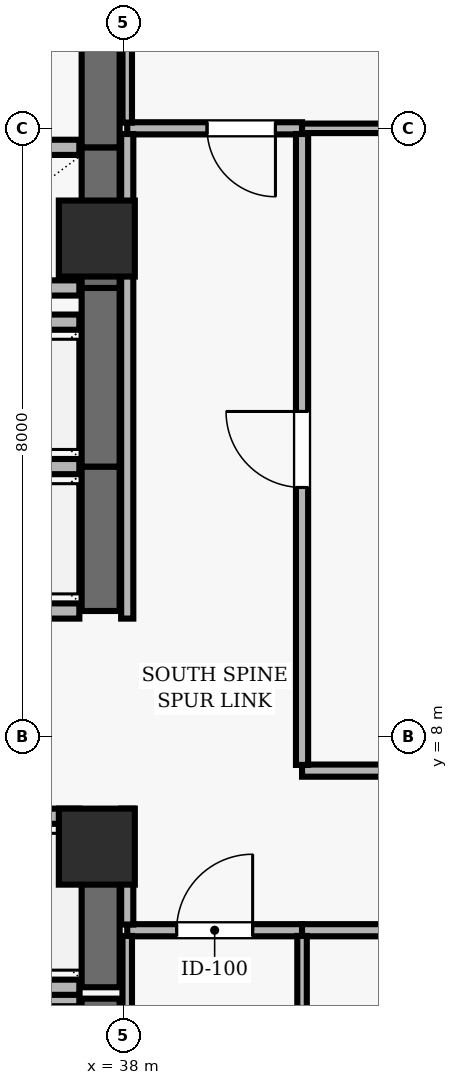
"""IFC4 building model, lengths in metres.
Left out: names, types, materials, properties, quantities, classifications, styles, units other than length and angle.
Written with IfcOpenShell. Run it as: python <this file> out.ifc"""

import sys

from ifc_helpers import new_model, si_unit, direction, frame, frame_2d, origin, origin_2d, place, context, subcontext, project, spatial, rectangle, extrude, element, fill, save


model = new_model("IFC4")
c1 = context("Model", 3, precision=1e-05, world=origin(), true_north=direction((0.0, 1.0)))
c2 = subcontext(c1, "Body", "Model", "MODEL_VIEW")
j1 = project(units=[si_unit("LENGTHUNIT", "METRE"), si_unit("PLANEANGLEUNIT", "RADIAN")], contexts=[c1])
p1 = place(None, origin())
s1 = spatial("IfcSite", under=j1, at=p1, CompositionType="ELEMENT")
p2 = place(p1, origin())
s2 = spatial("IfcBuilding", under=s1, at=p2, CompositionType="ELEMENT")
p3 = place(p2, frame((0.0, 0.0, 175.8)))
s3 = spatial("IfcBuildingStorey", under=s2, at=p3, CompositionType="ELEMENT", Elevation=175.8)
for number, where, z_axis, x_axis in (
    (1, (37.65, 6.55, 0.0), (0.0, 0.0, 1.0), (1.0, 0.0, 0.0)),
    (2, (37.65, 14.55, 0.0), (0.0, 0.0, 1.0), (1.0, 0.0, 0.0)),
):
    element("IfcColumn", number, at=place(p3, frame(where, z_axis=z_axis, x_axis=x_axis)), inside=s3, PredefinedType="COLUMN", context=c2, shape_type="SweptSolid", body=[
        extrude(rectangle(XDim=1.0, YDim=1.0, at=origin_2d()), origin(), (0.0, 0.0, 1.0), 3.9),
    ])
p4 = place(p3, frame((37.7, 2.45, 0.0), z_axis=(0.0, 0.0, 1.0), x_axis=(0.0, 1.0, 0.0)))
e3 = element("IfcWall", 3, at=p4, inside=s3, PredefinedType="SHEAR", context=c2, shape_type="SweptSolid", body=[
    extrude(rectangle(XDim=2.1, YDim=0.5, at=frame_2d((1.05, 0.0))), origin(), (0.0, 0.0, 1.0), 3.69),
])
p5 = place(p3, frame((37.42, 4.55, 0.0), z_axis=(0.0, 0.0, 1.0), x_axis=(-1.0, 0.0, 0.0)))
e4 = element("IfcWall", 4, at=p5, inside=s3, PredefinedType="SOLIDWALL", context=c2, shape_type="SweptSolid", body=[
    extrude(rectangle(XDim=2.14, YDim=0.2, at=frame_2d((1.07, 0.0))), origin(), (0.0, 0.0, 1.0), 3.69),
])
p6 = place(p3, frame((37.7, 4.7, 0.0), z_axis=(0.0, 0.0, 1.0), x_axis=(0.0, 1.0, 0.0)))
e5 = element("IfcWall", 5, at=p6, inside=s3, PredefinedType="SHEAR", context=c2, shape_type="SweptSolid", body=[
    extrude(rectangle(XDim=2.25, YDim=0.5, at=frame_2d((1.125, 0.0))), origin(), (0.0, 0.0, 1.0), 3.69),
])
for number, where, z_axis, x_axis in (
    (6, (35.28, 4.7, 0.0), (0.0, 0.0, 1.0), (1.0, 0.0, 0.0)),
    (7, (37.42, 6.95, 0.0), (0.0, 0.0, 1.0), (-1.0, 0.0, 0.0)),
):
    element("IfcWall", number, at=place(p3, frame(where, z_axis=z_axis, x_axis=x_axis)), inside=s3, PredefinedType="SOLIDWALL", context=c2, shape_type="SweptSolid", body=[
        extrude(rectangle(XDim=2.14, YDim=0.2, at=frame_2d((1.07, 0.0))), origin(), (0.0, 0.0, 1.0), 3.69),
    ])
p7 = place(p3, frame((37.7, 9.65, 0.0), z_axis=(0.0, 0.0, 1.0), x_axis=(0.0, 1.0, 0.0)))
e8 = element("IfcWall", 8, at=p7, inside=s3, PredefinedType="SHEAR", context=c2, shape_type="SweptSolid", body=[
    extrude(rectangle(XDim=1.9, YDim=0.5, at=frame_2d((0.95, 0.0))), origin(), (0.0, 0.0, 1.0), 3.69),
])
for number, where, z_axis, x_axis in (
    (9, (35.28, 9.65, 0.0), (0.0, 0.0, 1.0), (1.0, 0.0, 0.0)),
    (10, (37.42, 11.55, 0.0), (0.0, 0.0, 1.0), (-1.0, 0.0, 0.0)),
):
    element("IfcWall", number, at=place(p3, frame(where, z_axis=z_axis, x_axis=x_axis)), inside=s3, PredefinedType="SOLIDWALL", context=c2, shape_type="SweptSolid", body=[
        extrude(rectangle(XDim=2.14, YDim=0.2, at=frame_2d((1.07, 0.0))), origin(), (0.0, 0.0, 1.0), 3.69),
    ])
p8 = place(p3, frame((37.7, 11.55, 0.0), z_axis=(0.0, 0.0, 1.0), x_axis=(0.0, 1.0, 0.0)))
e11 = element("IfcWall", 11, at=p8, inside=s3, PredefinedType="SHEAR", context=c2, shape_type="SweptSolid", body=[
    extrude(rectangle(XDim=2.35, YDim=0.5, at=frame_2d((1.175, 0.0))), origin(), (0.0, 0.0, 1.0), 3.69),
])
p9 = place(p3, frame((37.42, 13.45, 0.0), z_axis=(0.0, 0.0, 1.0), x_axis=(-1.0, 0.0, 0.0)))
e12 = element("IfcWall", 12, at=p9, inside=s3, PredefinedType="SOLIDWALL", context=c2, shape_type="SweptSolid", body=[
    extrude(rectangle(XDim=2.14, YDim=0.2, at=frame_2d((1.07, 0.0))), origin(), (0.0, 0.0, 1.0), 3.69),
])
p10 = place(p3, frame((37.7, 13.9, 0.0), z_axis=(0.0, 0.0, 1.0), x_axis=(0.0, 1.0, 0.0)))
e13 = element("IfcWall", 13, at=p10, inside=s3, PredefinedType="SHEAR", context=c2, shape_type="SweptSolid", body=[
    extrude(rectangle(XDim=1.85, YDim=0.5, at=frame_2d((0.925, 0.0))), origin(), (0.0, 0.0, 1.0), 3.69),
])
for number, where, z_axis, x_axis in (
    (14, (35.28, 13.9, 0.0), (0.0, 0.0, 1.0), (1.0, 0.0, 0.0)),
    (15, (37.42, 15.75, 0.0), (0.0, 0.0, 1.0), (-1.0, 0.0, 0.0)),
):
    element("IfcWall", number, at=place(p3, frame(where, z_axis=z_axis, x_axis=x_axis)), inside=s3, PredefinedType="SOLIDWALL", context=c2, shape_type="SweptSolid", body=[
        extrude(rectangle(XDim=2.14, YDim=0.2, at=frame_2d((1.07, 0.0))), origin(), (0.0, 0.0, 1.0), 3.69),
    ])
p11 = place(p3, frame((37.7, 15.75, 0.0), z_axis=(0.0, 0.0, 1.0), x_axis=(0.0, 1.0, 0.0)))
e16 = element("IfcWall", 16, at=p11, inside=s3, PredefinedType="SHEAR", context=c2, shape_type="SweptSolid", body=[
    extrude(rectangle(XDim=1.85, YDim=0.5, at=frame_2d((0.925, 0.0))), origin(), (0.0, 0.0, 1.0), 3.69),
])
p12 = place(p3, frame((38.05, 5.45, 0.0), z_axis=(0.0, 0.0, 1.0), x_axis=(1.0, 0.0, 0.0)))
e17 = element("IfcWall", 17, at=p12, inside=s3, PredefinedType="PARTITIONING", context=c2, shape_type="SweptSolid", body=[
    extrude(rectangle(XDim=2.3, YDim=0.16, at=frame_2d((1.15, 0.0))), origin(), (0.0, 0.0, 1.0), 3.343),
])
p13 = place(p12, frame((0.65, 0.0, 0.0)))
e18 = element("IfcOpeningElement", 18, at=p13, cuts=e17, PredefinedType="OPENING", context=c2, shape_type="SweptSolid", body=[
    extrude(rectangle(XDim=1.0, YDim=2.1, at=frame_2d((0.5, 1.05))), frame((0.0, 0.09, 0.0), z_axis=(0.0, -1.0, 0.0), x_axis=(1.0, 0.0, 0.0)), (0.0, 0.0, 1.0), 0.18),
])
p14 = place(p3, frame((40.35, 5.45, 0.0), z_axis=(0.0, 0.0, 1.0), x_axis=(1.0, 0.0, 0.0)))
e19 = element("IfcWall", 19, at=p14, inside=s3, PredefinedType="PARTITIONING", context=c2, shape_type="SweptSolid", body=[
    extrude(rectangle(XDim=8.2, YDim=0.16, at=frame_2d((4.1, 0.0))), origin(), (0.0, 0.0, 1.0), 3.343),
])
p15 = place(p14, frame((3.65, 0.0, 0.0)))
e20 = element("IfcOpeningElement", 20, at=p15, cuts=e19, PredefinedType="OPENING", context=c2, shape_type="SweptSolid", body=[
    extrude(rectangle(XDim=0.9, YDim=2.1, at=frame_2d((0.45, 1.05))), frame((0.0, 0.09, 0.0), z_axis=(0.0, -1.0, 0.0), x_axis=(1.0, 0.0, 0.0)), (0.0, 0.0, 1.0), 0.18),
])
p16 = place(p3, frame((40.35, 16.0, 0.0), z_axis=(0.0, 0.0, 1.0), x_axis=(-1.0, 0.0, 0.0)))
e21 = element("IfcWall", 21, at=p16, inside=s3, PredefinedType="PARTITIONING", context=c2, shape_type="SweptSolid", body=[
    extrude(rectangle(XDim=2.3, YDim=0.16, at=frame_2d((1.15, 0.0))), origin(), (0.0, 0.0, 1.0), 3.69),
])
p17 = place(p16, frame((0.35, 0.0, 0.0)))
e22 = element("IfcOpeningElement", 22, at=p17, cuts=e21, PredefinedType="OPENING", context=c2, shape_type="SweptSolid", body=[
    extrude(rectangle(XDim=0.9, YDim=2.1, at=frame_2d((0.45, 1.05))), frame((0.0, 0.09, 0.0), z_axis=(0.0, -1.0, 0.0), x_axis=(1.0, 0.0, 0.0)), (0.0, 0.0, 1.0), 0.18),
])
p18 = place(p3, frame((48.55, 7.55, 0.0), z_axis=(0.0, 0.0, 1.0), x_axis=(-1.0, 0.0, 0.0)))
e23 = element("IfcWall", 23, at=p18, inside=s3, PredefinedType="PARTITIONING", context=c2, shape_type="SweptSolid", body=[
    extrude(rectangle(XDim=8.2, YDim=0.16, at=frame_2d((4.1, 0.0))), origin(), (0.0, 0.0, 1.0), 3.139),
])
p19 = place(p3, frame((48.55, 16.0, 0.0), z_axis=(0.0, 0.0, 1.0), x_axis=(-1.0, 0.0, 0.0)))
e24 = element("IfcWall", 24, at=p19, inside=s3, PredefinedType="PARTITIONING", context=c2, shape_type="SweptSolid", body=[
    extrude(rectangle(XDim=8.2, YDim=0.125, at=frame_2d((4.1, 0.0))), origin(), (0.0, 0.0, 1.0), 3.69),
])
p20 = place(p3, frame((38.05, 5.375, 0.0), z_axis=(0.0, 0.0, 1.0), x_axis=(0.0, -1.0, 0.0)))
e25 = element("IfcWall", 25, at=p20, inside=s3, PredefinedType="PARTITIONING", context=c2, shape_type="SweptSolid", body=[
    extrude(rectangle(XDim=5.23, YDim=0.125, at=frame_2d((2.615, 0.0))), origin(), (0.0, 0.0, 1.0), 3.139),
])
p21 = place(p3, frame((38.05, 7.05, 0.0), z_axis=(0.0, 0.0, 1.0), x_axis=(0.0, -1.0, 0.0)))
e26 = element("IfcWall", 26, at=p21, inside=s3, PredefinedType="PARTITIONING", context=c2, shape_type="SweptSolid", body=[
    extrude(rectangle(XDim=1.525, YDim=0.16, at=frame_2d((0.763, 0.0))), origin(), (0.0, 0.0, 1.0), 3.139),
])
p22 = place(p3, frame((38.05, 15.925, 0.0), z_axis=(0.0, 0.0, 1.0), x_axis=(0.0, -1.0, 0.0)))
e27 = element("IfcWall", 27, at=p22, inside=s3, PredefinedType="PARTITIONING", context=c2, shape_type="SweptSolid", body=[
    extrude(rectangle(XDim=6.375, YDim=0.16, at=frame_2d((3.188, 0.0))), origin(), (0.0, 0.0, 1.0), 3.139),
])
p23 = place(p3, frame((38.05, 24.0, 0.0), z_axis=(0.0, 0.0, 1.0), x_axis=(0.0, -1.0, 0.0)))
e28 = element("IfcWall", 28, at=p23, inside=s3, PredefinedType="PARTITIONING", context=c2, shape_type="SweptSolid", body=[
    extrude(rectangle(XDim=7.925, YDim=0.125, at=frame_2d((3.962, 0.0))), origin(), (0.0, 0.0, 1.0), 3.139),
])
p24 = place(p3, frame((40.35, 0.145, 0.0), z_axis=(0.0, 0.0, 1.0), x_axis=(0.0, 1.0, 0.0)))
e29 = element("IfcWall", 29, at=p24, inside=s3, PredefinedType="PARTITIONING", context=c2, shape_type="SweptSolid", body=[
    extrude(rectangle(XDim=5.23, YDim=0.125, at=frame_2d((2.615, 0.0))), origin(), (0.0, 0.0, 1.0), 3.69),
])
p25 = place(p3, frame((40.35, 7.625, 0.0), z_axis=(0.0, 0.0, 1.0), x_axis=(0.0, 1.0, 0.0)))
e30 = element("IfcWall", 30, at=p25, inside=s3, PredefinedType="PARTITIONING", context=c2, shape_type="SweptSolid", body=[
    extrude(rectangle(XDim=8.3, YDim=0.16, at=frame_2d((4.15, 0.0))), origin(), (0.0, 0.0, 1.0), 3.343),
])
p26 = place(p25, frame((3.65, 0.0, 0.0)))
e31 = element("IfcOpeningElement", 31, at=p26, cuts=e30, PredefinedType="OPENING", context=c2, shape_type="SweptSolid", body=[
    extrude(rectangle(XDim=1.0, YDim=2.1, at=frame_2d((0.5, 1.05))), frame((0.0, 0.09, 0.0), z_axis=(0.0, -1.0, 0.0), x_axis=(1.0, 0.0, 0.0)), (0.0, 0.0, 1.0), 0.18),
])
p27 = place(p13, origin())
e32 = element("IfcDoor", 32, at=p27, inside=s3, OperationType="SINGLE_SWING_RIGHT", PredefinedType="DOOR", context=c2, shape_type="SweptSolid", body=[
    extrude(rectangle(XDim=1.0, YDim=2.1, at=frame_2d((0.5, 1.05))), frame((0.0, 0.025, 0.0), z_axis=(0.0, -1.0, 0.0), x_axis=(1.0, 0.0, 0.0)), (0.0, 0.0, 1.0), 0.05),
])
fill(e18, e32)
p28 = place(p26, origin())
e33 = element("IfcDoor", 33, at=p28, inside=s3, OperationType="SINGLE_SWING_RIGHT", PredefinedType="DOOR", context=c2, shape_type="SweptSolid", body=[
    extrude(rectangle(XDim=1.0, YDim=2.1, at=frame_2d((0.5, 1.05))), frame((0.0, 0.025, 0.0), z_axis=(0.0, -1.0, 0.0), x_axis=(1.0, 0.0, 0.0)), (0.0, 0.0, 1.0), 0.05),
])
fill(e31, e33)
p29 = place(p17, origin())
e34 = element("IfcDoor", 34, at=p29, inside=s3, OperationType="SINGLE_SWING_LEFT", PredefinedType="DOOR", context=c2, shape_type="SweptSolid", body=[
    extrude(rectangle(XDim=0.9, YDim=2.1, at=frame_2d((0.45, 1.05))), frame((0.0, 0.025, 0.0), z_axis=(0.0, -1.0, 0.0), x_axis=(1.0, 0.0, 0.0)), (0.0, 0.0, 1.0), 0.05),
])
fill(e22, e34)
save(model, sys.argv[1])
